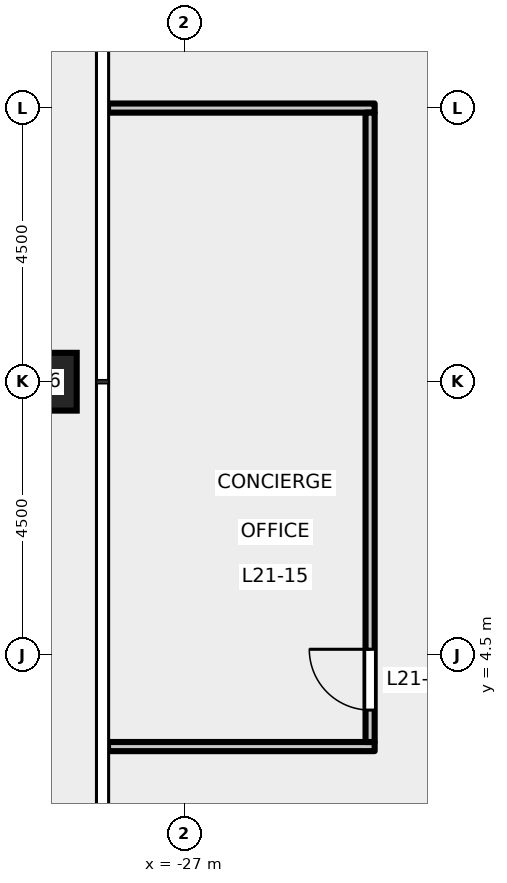
"""IFC4 building model, lengths in metres.
Left out: names, types, materials, properties, quantities, classifications, styles, units other than length and angle.
Written with IfcOpenShell. Run it as: python <this file> out.ifc"""

import sys

from ifc_helpers import new_model, si_unit, direction, frame, frame_2d, origin, origin_2d, place, context, subcontext, project, spatial, rectangle, hollow_rectangle, extrude, element, fill, save


model = new_model("IFC4")
c1 = context("Model", 3, precision=1e-05, world=origin(), true_north=direction((0.0, 1.0)))
c2 = subcontext(c1, "Body", "Model", "MODEL_VIEW")
j1 = project(units=[si_unit("LENGTHUNIT", "METRE"), si_unit("PLANEANGLEUNIT", "RADIAN")], contexts=[c1])
p1 = place(None, origin())
s1 = spatial("IfcSite", under=j1, at=p1, CompositionType="ELEMENT")
p2 = place(p1, origin())
s2 = spatial("IfcBuilding", under=s1, at=p2, CompositionType="ELEMENT")
p3 = place(p2, frame((0.0, 0.0, 99.2)))
s3 = spatial("IfcBuildingStorey", under=s2, at=p3, CompositionType="ELEMENT", Elevation=99.2)
p4 = place(p3, frame((-29.25, 9.0, -0.2), z_axis=(0.0, 0.0, 1.0), x_axis=(1.0, 0.0, 0.0)))
e1 = element("IfcColumn", 1, at=p4, inside=s3, PredefinedType="COLUMN", context=c2, shape_type="SweptSolid", body=[
    extrude(hollow_rectangle(XDim=0.95, YDim=0.95, WallThickness=0.055, at=origin_2d()), origin(), (0.0, 0.0, 1.0), 5.7),
])
for number, where, z_axis, x_axis in (
    (2, (-28.26, 3.0, 0.0), (0.0, 0.0, 1.0), (1.0, 0.0, 0.0)),
    (3, (-28.26, 13.5, 0.0), (0.0, 0.0, 1.0), (1.0, 0.0, 0.0)),
):
    element("IfcWall", number, at=place(p3, frame(where, z_axis=z_axis, x_axis=x_axis)), inside=s3, PredefinedType="PARTITIONING", context=c2, shape_type="SweptSolid", body=[
        extrude(rectangle(XDim=4.385, YDim=0.15, at=frame_2d((2.192, 0.0))), origin(), (0.0, 0.0, 1.0), 5.35),
    ])
p5 = place(p3, frame((-23.95, 3.075, 0.0), z_axis=(0.0, 0.0, 1.0), x_axis=(0.0, 1.0, 0.0)))
e4 = element("IfcWall", 4, at=p5, inside=s3, PredefinedType="PARTITIONING", context=c2, shape_type="SweptSolid", body=[
    extrude(rectangle(XDim=10.35, YDim=0.15, at=frame_2d((5.175, 0.0))), origin(), (0.0, 0.0, 1.0), 5.35),
])
p6 = place(p5, frame((0.525, 0.0, 0.0)))
e5 = element("IfcOpeningElement", 5, at=p6, cuts=e4, PredefinedType="OPENING", context=c2, shape_type="SweptSolid", body=[
    extrude(rectangle(XDim=1.0, YDim=2.1, at=frame_2d((0.5, 1.05))), frame((0.0, 0.085, 0.0), z_axis=(0.0, -1.0, 0.0), x_axis=(1.0, 0.0, 0.0)), (0.0, 0.0, 1.0), 0.17),
])
p7 = place(p6, origin())
e6 = element("IfcDoor", 6, at=p7, inside=s3, OperationType="SINGLE_SWING_RIGHT", PredefinedType="DOOR", context=c2, shape_type="SweptSolid", body=[
    extrude(rectangle(XDim=1.0, YDim=2.1, at=frame_2d((0.5, 1.05))), frame((0.0, 0.025, 0.0), z_axis=(0.0, -1.0, 0.0), x_axis=(1.0, 0.0, 0.0)), (0.0, 0.0, 1.0), 0.05),
])
fill(e5, e6)
save(model, sys.argv[1])
